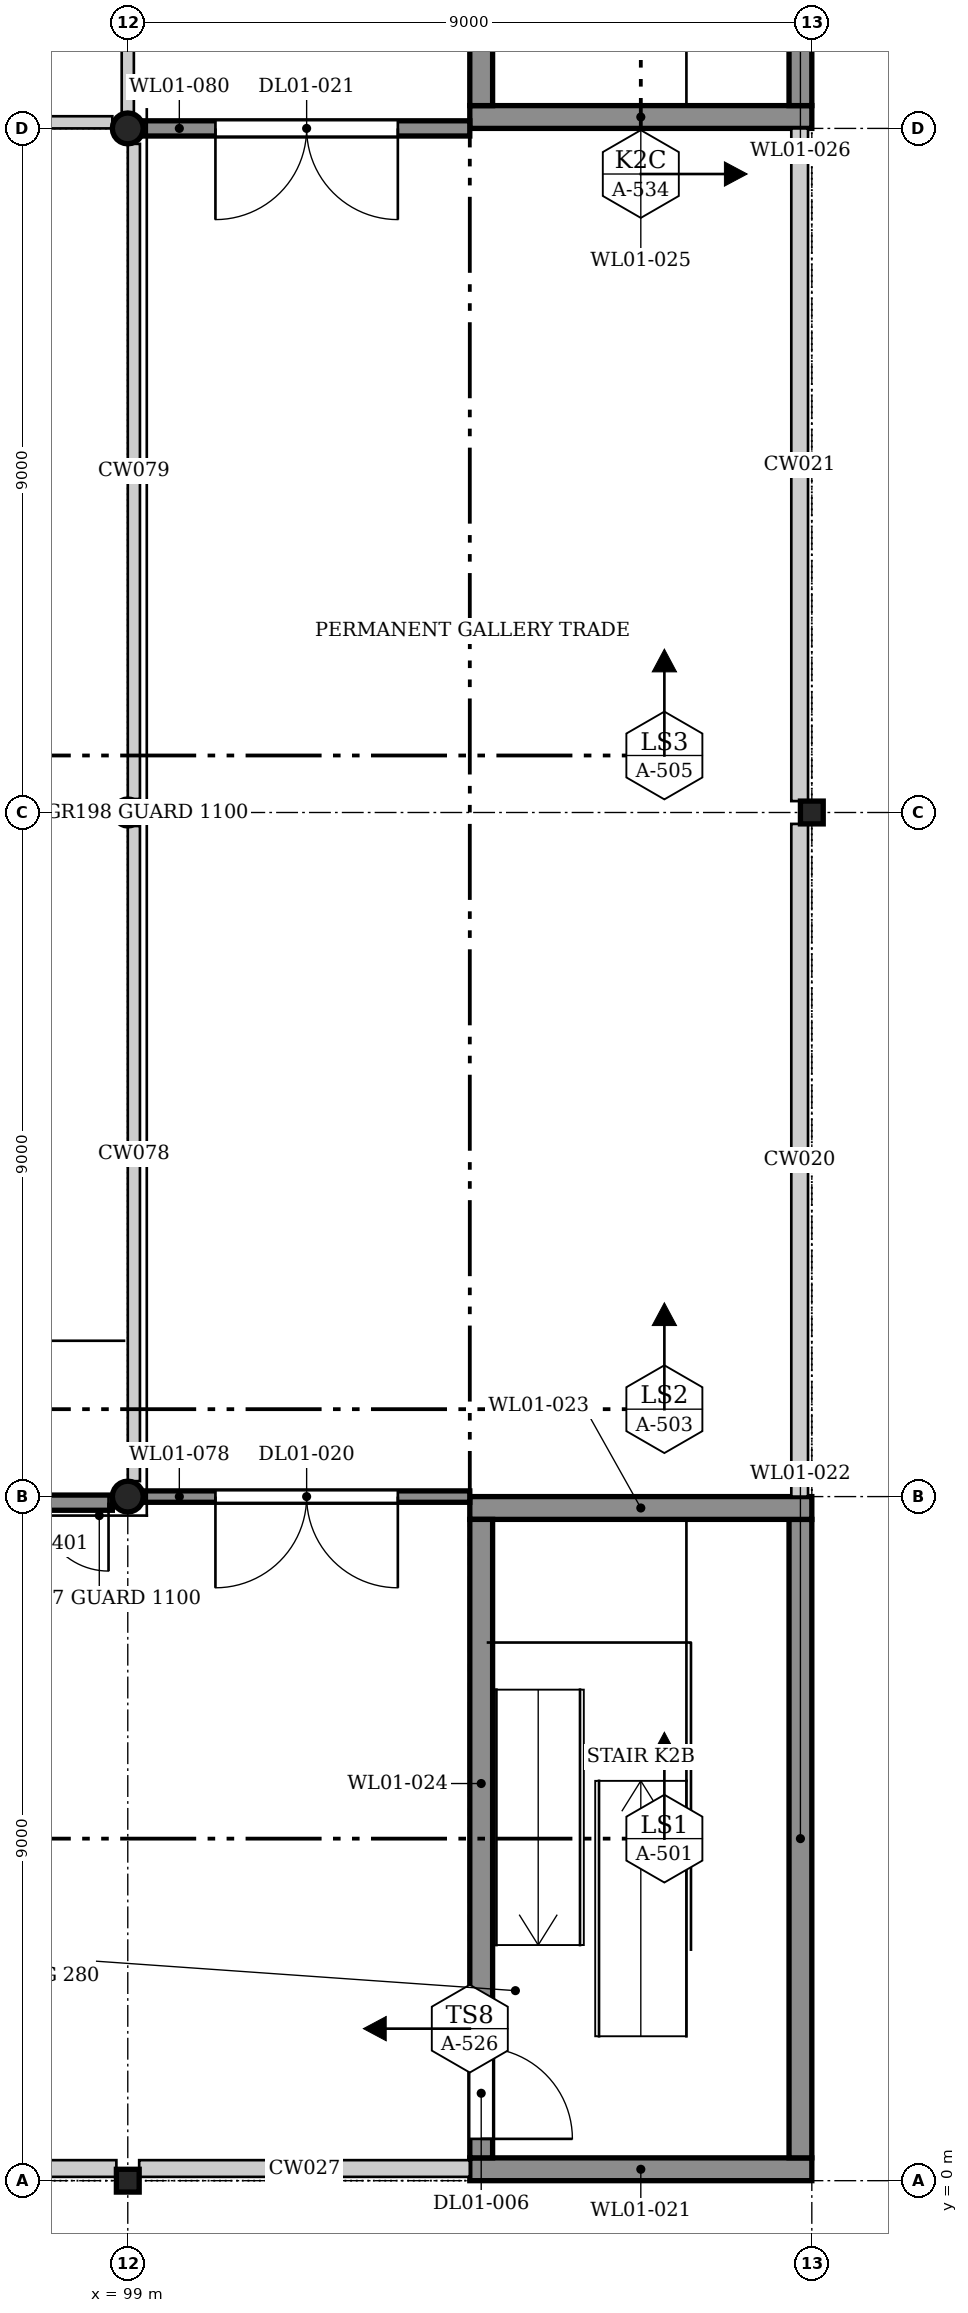
"""IFC4 building model, lengths in metres.
Left out: names, types, materials, properties, quantities, classifications, styles, units other than length and angle.
Written with IfcOpenShell. Run it as: python <this file> out.ifc"""

import sys

from ifc_helpers import new_model, si_unit, direction, frame, frame_2d, origin, origin_2d, place, context, subcontext, project, spatial, rectangle, hollow_rectangle, hollow_circle, extrude, element, fill, save


model = new_model("IFC4")
c1 = context("Model", 3, precision=1e-05, world=origin(), true_north=direction((0.0, 1.0)))
c2 = subcontext(c1, "Body", "Model", "MODEL_VIEW")
j1 = project(units=[si_unit("LENGTHUNIT", "METRE"), si_unit("PLANEANGLEUNIT", "RADIAN")], contexts=[c1])
p1 = place(None, origin())
s1 = spatial("IfcSite", under=j1, at=p1, CompositionType="ELEMENT")
p2 = place(p1, origin())
s2 = spatial("IfcBuilding", under=s1, at=p2, CompositionType="ELEMENT")
p3 = place(p2, frame((0.0, 0.0, 5.0)))
s3 = spatial("IfcBuildingStorey", under=s2, at=p3, CompositionType="ELEMENT", Elevation=5.0)
p4 = place(p3, frame((99.0, 0.0, 0.0), z_axis=(0.0, 0.0, 1.0), x_axis=(1.0, 0.0, 0.0)))
e1 = element("IfcColumn", 1, at=p4, inside=s3, PredefinedType="COLUMN", context=c2, shape_type="SweptSolid", body=[
    extrude(hollow_rectangle(XDim=0.3, YDim=0.3, WallThickness=0.016, InnerFilletRadius=0.024, OuterFilletRadius=0.04, at=origin_2d()), origin(), (0.0, 0.0, 1.0), 4.2),
])
p5 = place(p3, frame((99.0, 9.0, 0.0), z_axis=(0.0, 0.0, 1.0), x_axis=(1.0, 0.0, 0.0)))
e2 = element("IfcColumn", 2, at=p5, inside=s3, PredefinedType="COLUMN", context=c2, shape_type="SweptSolid", body=[
    extrude(hollow_circle(Radius=0.203, WallThickness=0.013, at=origin_2d()), origin(), (0.0, 0.0, 1.0), 4.2),
])
p6 = place(p3, frame((99.0, 18.0, 0.0), z_axis=(0.0, 0.0, 1.0), x_axis=(1.0, 0.0, 0.0)))
e3 = element("IfcColumn", 3, at=p6, inside=s3, PredefinedType="COLUMN", context=c2, shape_type="SweptSolid", body=[
    extrude(hollow_circle(Radius=0.178, WallThickness=0.013, at=origin_2d()), origin(), (0.0, 0.0, 1.0), 4.2),
])
p7 = place(p3, frame((108.0, 18.0, 0.0), z_axis=(0.0, 0.0, 1.0), x_axis=(1.0, 0.0, 0.0)))
e4 = element("IfcColumn", 4, at=p7, inside=s3, PredefinedType="COLUMN", context=c2, shape_type="SweptSolid", body=[
    extrude(hollow_rectangle(XDim=0.3, YDim=0.3, WallThickness=0.016, InnerFilletRadius=0.024, OuterFilletRadius=0.04, at=origin_2d()), origin(), (0.0, 0.0, 1.0), 4.2),
])
p8 = place(p3, frame((99.0, 27.0, 0.0), z_axis=(0.0, 0.0, 1.0), x_axis=(1.0, 0.0, 0.0)))
e5 = element("IfcColumn", 5, at=p8, inside=s3, PredefinedType="COLUMN", context=c2, shape_type="SweptSolid", body=[
    extrude(hollow_circle(Radius=0.203, WallThickness=0.013, at=origin_2d()), origin(), (0.0, 0.0, 1.0), 4.2),
])
p9 = place(p3, frame((96.7, 8.92, 0.0), z_axis=(0.0, 0.0, 1.0), x_axis=(1.0, 0.0, 0.0)))
e6 = element("IfcWall", 6, at=p9, inside=s3, PredefinedType="SOLIDWALL", context=c2, shape_type="SweptSolid", body=[
    extrude(rectangle(XDim=2.097, YDim=0.2, at=frame_2d((1.048, 0.0))), origin(), (0.0, 0.0, 1.0), 3.125),
])
p10 = place(p9, frame((0.247, 0.0, 0.0)))
e7 = element("IfcOpeningElement", 7, at=p10, cuts=e6, PredefinedType="OPENING", context=c2, shape_type="SweptSolid", body=[
    extrude(rectangle(XDim=1.8, YDim=2.4, at=frame_2d((0.9, 1.2))), frame((0.0, 0.11, 0.0), z_axis=(0.0, -1.0, 0.0), x_axis=(1.0, 0.0, 0.0)), (0.0, 0.0, 1.0), 0.22),
])
p11 = place(p3, frame((103.5, 0.15, 0.0), z_axis=(0.0, 0.0, 1.0), x_axis=(1.0, 0.0, 0.0)))
e8 = element("IfcWall", 8, at=p11, inside=s3, PredefinedType="SOLIDWALL", context=c2, shape_type="SweptSolid", body=[
    extrude(rectangle(XDim=4.5, YDim=0.3, at=frame_2d((2.25, 0.0))), origin(), (0.0, 0.0, 1.0), 4.2),
])
p12 = place(p3, frame((107.85, 0.3, 0.0), z_axis=(0.0, 0.0, 1.0), x_axis=(0.0, 1.0, 0.0)))
e9 = element("IfcWall", 9, at=p12, inside=s3, PredefinedType="SOLIDWALL", context=c2, shape_type="SweptSolid", body=[
    extrude(rectangle(XDim=8.4, YDim=0.3, at=frame_2d((4.2, 0.0))), origin(), (0.0, 0.0, 1.0), 4.2),
])
p13 = place(p3, frame((103.5, 8.85, 0.0), z_axis=(0.0, 0.0, 1.0), x_axis=(1.0, 0.0, 0.0)))
e10 = element("IfcWall", 10, at=p13, inside=s3, PredefinedType="SOLIDWALL", context=c2, shape_type="SweptSolid", body=[
    extrude(rectangle(XDim=4.5, YDim=0.3, at=frame_2d((2.25, 0.0))), origin(), (0.0, 0.0, 1.0), 4.2),
])
p14 = place(p3, frame((103.65, 0.3, 0.0), z_axis=(0.0, 0.0, 1.0), x_axis=(0.0, 1.0, 0.0)))
e11 = element("IfcWall", 11, at=p14, inside=s3, PredefinedType="SOLIDWALL", context=c2, shape_type="SweptSolid", body=[
    extrude(rectangle(XDim=8.4, YDim=0.3, at=frame_2d((4.2, 0.0))), origin(), (0.0, 0.0, 1.0), 4.2),
])
p15 = place(p14, frame((0.25, 0.0, 0.0)))
e12 = element("IfcOpeningElement", 12, at=p15, cuts=e11, PredefinedType="OPENING", context=c2, shape_type="SweptSolid", body=[
    extrude(rectangle(XDim=1.2, YDim=2.1, at=frame_2d((0.6, 1.05))), frame((0.0, 0.16, 0.0), z_axis=(0.0, -1.0, 0.0), x_axis=(1.0, 0.0, 0.0)), (0.0, 0.0, 1.0), 0.32),
])
p16 = place(p3, frame((103.5, 27.15, 0.0), z_axis=(0.0, 0.0, 1.0), x_axis=(1.0, 0.0, 0.0)))
e13 = element("IfcWall", 13, at=p16, inside=s3, PredefinedType="SOLIDWALL", context=c2, shape_type="SweptSolid", body=[
    extrude(rectangle(XDim=4.5, YDim=0.3, at=frame_2d((2.25, 0.0))), origin(), (0.0, 0.0, 1.0), 4.2),
])
for number, where, z_axis, x_axis in (
    (14, (107.85, 27.3, 0.0), (0.0, 0.0, 1.0), (0.0, 1.0, 0.0)),
    (15, (103.65, 27.3, 0.0), (0.0, 0.0, 1.0), (0.0, 1.0, 0.0)),
):
    element("IfcWall", number, at=place(p3, frame(where, z_axis=z_axis, x_axis=x_axis)), inside=s3, PredefinedType="SOLIDWALL", context=c2, shape_type="SweptSolid", body=[
        extrude(rectangle(XDim=8.4, YDim=0.3, at=frame_2d((4.2, 0.0))), origin(), (0.0, 0.0, 1.0), 4.2),
    ])
p17 = place(p3, frame((99.203, 9.0, 0.0), z_axis=(0.0, 0.0, 1.0), x_axis=(1.0, 0.0, 0.0)))
e16 = element("IfcWall", 16, at=p17, inside=s3, PredefinedType="PARTITIONING", context=c2, shape_type="SweptSolid", body=[
    extrude(rectangle(XDim=4.297, YDim=0.15, at=frame_2d((2.148, 0.0))), origin(), (0.0, 0.0, 1.0), 3.502),
])
p18 = place(p17, frame((0.95, 0.0, 0.0)))
e17 = element("IfcOpeningElement", 17, at=p18, cuts=e16, PredefinedType="OPENING", context=c2, shape_type="SweptSolid", body=[
    extrude(rectangle(XDim=2.4, YDim=2.4, at=frame_2d((1.2, 1.2))), frame((0.0, 0.085, 0.0), z_axis=(0.0, -1.0, 0.0), x_axis=(1.0, 0.0, 0.0)), (0.0, 0.0, 1.0), 0.17),
])
p19 = place(p3, frame((99.203, 27.0, 0.0), z_axis=(0.0, 0.0, 1.0), x_axis=(1.0, 0.0, 0.0)))
e18 = element("IfcWall", 18, at=p19, inside=s3, PredefinedType="PARTITIONING", context=c2, shape_type="SweptSolid", body=[
    extrude(rectangle(XDim=4.297, YDim=0.2, at=frame_2d((2.148, 0.0))), origin(), (0.0, 0.0, 1.0), 3.502),
])
p20 = place(p19, frame((0.95, 0.0, 0.0)))
e19 = element("IfcOpeningElement", 19, at=p20, cuts=e18, PredefinedType="OPENING", context=c2, shape_type="SweptSolid", body=[
    extrude(rectangle(XDim=2.4, YDim=2.4, at=frame_2d((1.2, 1.2))), frame((0.0, 0.11, 0.0), z_axis=(0.0, -1.0, 0.0), x_axis=(1.0, 0.0, 0.0)), (0.0, 0.0, 1.0), 0.22),
])
p21 = place(p10, frame((1.8, 0.0, 0.0), z_axis=(0.0, 0.0, 1.0), x_axis=(-1.0, 0.0, 0.0)))
e20 = element("IfcDoor", 20, at=p21, inside=s3, OperationType="DOUBLE_DOOR_SINGLE_SWING", PredefinedType="DOOR", context=c2, shape_type="SweptSolid", body=[
    extrude(rectangle(XDim=1.8, YDim=2.4, at=frame_2d((0.9, 1.2))), frame((0.0, 0.025, 0.0), z_axis=(0.0, -1.0, 0.0), x_axis=(1.0, 0.0, 0.0)), (0.0, 0.0, 1.0), 0.05),
])
fill(e7, e20)
p22 = place(p15, frame((1.2, 0.0, 0.0), z_axis=(0.0, 0.0, 1.0), x_axis=(-1.0, 0.0, 0.0)))
e21 = element("IfcDoor", 21, at=p22, inside=s3, OperationType="SINGLE_SWING_LEFT", PredefinedType="DOOR", context=c2, shape_type="SweptSolid", body=[
    extrude(rectangle(XDim=1.2, YDim=2.1, at=frame_2d((0.6, 1.05))), frame((0.0, 0.025, 0.0), z_axis=(0.0, -1.0, 0.0), x_axis=(1.0, 0.0, 0.0)), (0.0, 0.0, 1.0), 0.05),
])
fill(e12, e21)
p23 = place(p18, frame((2.4, 0.0, 0.0), z_axis=(0.0, 0.0, 1.0), x_axis=(-1.0, 0.0, 0.0)))
e22 = element("IfcDoor", 22, at=p23, inside=s3, OperationType="DOUBLE_DOOR_SINGLE_SWING", PredefinedType="DOOR", context=c2, shape_type="SweptSolid", body=[
    extrude(rectangle(XDim=2.4, YDim=2.4, at=frame_2d((1.2, 1.2))), frame((0.0, 0.025, 0.0), z_axis=(0.0, -1.0, 0.0), x_axis=(1.0, 0.0, 0.0)), (0.0, 0.0, 1.0), 0.05),
])
fill(e17, e22)
p24 = place(p20, frame((2.4, 0.0, 0.0), z_axis=(0.0, 0.0, 1.0), x_axis=(-1.0, 0.0, 0.0)))
e23 = element("IfcDoor", 23, at=p24, inside=s3, OperationType="DOUBLE_DOOR_SINGLE_SWING", PredefinedType="DOOR", context=c2, shape_type="SweptSolid", body=[
    extrude(rectangle(XDim=2.4, YDim=2.4, at=frame_2d((1.2, 1.2))), frame((0.0, 0.025, 0.0), z_axis=(0.0, -1.0, 0.0), x_axis=(1.0, 0.0, 0.0)), (0.0, 0.0, 1.0), 0.05),
])
fill(e19, e23)
save(model, sys.argv[1])
